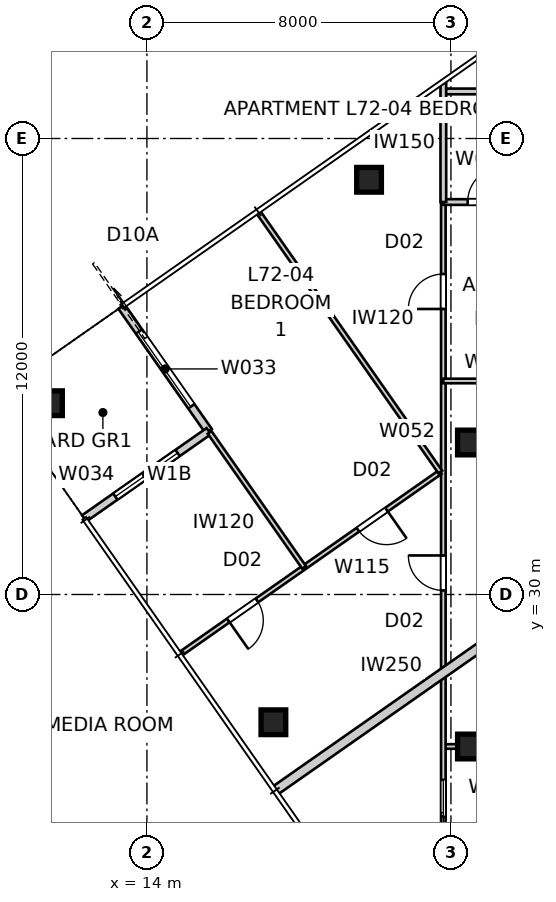
"""IFC4 building model, lengths in metres.
Left out: names, types, materials, properties, quantities, classifications, styles, units other than length and angle.
Written with IfcOpenShell. Run it as: python <this file> out.ifc"""

import sys

from ifc_helpers import new_model, si_unit, direction, frame, frame_2d, origin, origin_2d, place, context, subcontext, project, spatial, rectangle, extrude, element, fill, save


model = new_model("IFC4")
c1 = context("Model", 3, precision=1e-05, world=origin(), true_north=direction((0.0, 1.0)))
c2 = subcontext(c1, "Body", "Model", "MODEL_VIEW")
j1 = project(units=[si_unit("LENGTHUNIT", "METRE"), si_unit("PLANEANGLEUNIT", "RADIAN")], contexts=[c1])
p1 = place(None, origin())
s1 = spatial("IfcSite", under=j1, at=p1, CompositionType="ELEMENT")
p2 = place(p1, origin())
s2 = spatial("IfcBuilding", under=s1, at=p2, CompositionType="ELEMENT")
p3 = place(p2, frame((0.0, 0.0, 260.8)))
s3 = spatial("IfcBuildingStorey", under=s2, at=p3, CompositionType="ELEMENT", Elevation=260.8)
for number, where, z_axis, x_axis in (
    (1, (19.845, 40.914, 0.0), (0.0, 0.0, 1.0), (1.0, 0.0, 0.0)),
    (2, (11.449, 35.034, 0.0), (0.0, 0.0, 1.0), (1.0, 0.0, 0.0)),
    (3, (17.328, 26.638, 0.0), (0.0, 0.0, 1.0), (1.0, 0.0, 0.0)),
    (4, (22.5, 34.0, 0.0), (0.0, 0.0, 1.0), (1.0, 0.0, 0.0)),
    (5, (22.5, 26.0, 0.0), (0.0, 0.0, 1.0), (1.0, 0.0, 0.0)),
):
    element("IfcColumn", number, at=place(p3, frame(where, z_axis=z_axis, x_axis=x_axis)), inside=s3, PredefinedType="COLUMN", context=c2, shape_type="SweptSolid", body=[
        extrude(rectangle(XDim=0.65, YDim=0.65, at=origin_2d()), origin(), (0.0, 0.0, 1.0), 3.4),
    ])
p4 = place(p3, frame((13.333, 37.574, 0.0), z_axis=(0.0, 0.0, 1.0), x_axis=(0.573556557423, -0.819165963305, 0.0)))
e6 = element("IfcWall", 6, at=p4, inside=s3, PredefinedType="SOLIDWALL", context=c2, shape_type="SweptSolid", body=[
    extrude(rectangle(XDim=4.0, YDim=0.2, at=frame_2d((2.0, 0.0))), origin(), (0.0, 0.0, 1.0), 3.25),
])
p5 = place(p4, frame((0.8, 0.0, 0.0)))
e7 = element("IfcOpeningElement", 7, at=p5, cuts=e6, PredefinedType="OPENING", context=c2, shape_type="SweptSolid", body=[
    extrude(rectangle(XDim=2.4, YDim=2.1, at=frame_2d((1.2, 1.05))), frame((0.0, 0.11, 0.0), z_axis=(0.0, -1.0, 0.0), x_axis=(1.0, 0.0, 0.0)), (0.0, 0.0, 1.0), 0.22),
])
p6 = place(p3, frame((15.627, 34.298, 0.0), z_axis=(0.0, 0.0, 1.0), x_axis=(-0.819137286189, -0.573597512525, 0.0)))
e8 = element("IfcWall", 8, at=p6, inside=s3, PredefinedType="SOLIDWALL", context=c2, shape_type="SweptSolid", body=[
    extrude(rectangle(XDim=4.0, YDim=0.2, at=frame_2d((2.0, 0.0))), origin(), (0.0, 0.0, 1.0), 3.25),
])
p7 = place(p6, frame((1.0, 0.0, 0.45)))
e9 = element("IfcOpeningElement", 9, at=p7, cuts=e8, PredefinedType="OPENING", context=c2, shape_type="SweptSolid", body=[
    extrude(rectangle(XDim=2.0, YDim=1.8, at=frame_2d((1.0, 0.9))), frame((0.0, 0.11, 0.0), z_axis=(0.0, -1.0, 0.0), x_axis=(1.0, 0.0, 0.0)), (0.0, 0.0, 1.0), 0.22),
])
p8 = place(p3, frame((17.369, 24.836, 0.0), z_axis=(0.0, 0.0, 1.0), x_axis=(0.819152220062, 0.573576185321, 0.0)))
e10 = element("IfcWall", 10, at=p8, inside=s3, PredefinedType="PARTITIONING", context=c2, shape_type="SweptSolid", body=[
    extrude(rectangle(XDim=8.779, YDim=0.25, at=frame_2d((4.39, 0.0))), origin(), (0.0, 0.0, 1.0), 3.25),
])
p9 = place(p3, frame((24.6, 26.0, 0.0), z_axis=(0.0, 0.0, 1.0), x_axis=(-1.0, 0.0, 0.0)))
e11 = element("IfcWall", 11, at=p9, inside=s3, PredefinedType="PARTITIONING", context=c2, shape_type="SweptSolid", body=[
    extrude(rectangle(XDim=2.8, YDim=0.12, at=frame_2d((1.4, 0.0))), origin(), (0.0, 0.0, 1.0), 3.25),
])
p10 = place(p9, frame((0.77, 0.0, 0.0)))
e12 = element("IfcOpeningElement", 12, at=p10, cuts=e11, PredefinedType="OPENING", context=c2, shape_type="SweptSolid", body=[
    extrude(rectangle(XDim=0.96, YDim=2.1, at=frame_2d((0.48, 1.05))), frame((0.0, 0.07, 0.0), z_axis=(0.0, -1.0, 0.0), x_axis=(1.0, 0.0, 0.0)), (0.0, 0.0, 1.0), 0.14),
])
p11 = place(p3, frame((21.8, 18.578, 0.0), z_axis=(0.0, 0.0, 1.0), x_axis=(0.0, 1.0, 0.0)))
e13 = element("IfcWall", 13, at=p11, inside=s3, PredefinedType="PARTITIONING", context=c2, shape_type="SweptSolid", body=[
    extrude(rectangle(XDim=21.75, YDim=0.12, at=frame_2d((10.875, 0.0))), origin(), (0.0, 0.0, 1.0), 3.25),
])
p12 = place(p11, frame((11.53, 0.0, 0.0)))
e14 = element("IfcOpeningElement", 14, at=p12, cuts=e13, PredefinedType="OPENING", context=c2, shape_type="SweptSolid", body=[
    extrude(rectangle(XDim=0.92, YDim=2.34, at=frame_2d((0.46, 1.17))), frame((0.0, 0.07, 0.0), z_axis=(0.0, -1.0, 0.0), x_axis=(1.0, 0.0, 0.0)), (0.0, 0.0, 1.0), 0.14),
])
p13 = place(p11, frame((5.585, 0.0, 0.0)))
e15 = element("IfcOpeningElement", 15, at=p13, cuts=e13, PredefinedType="OPENING", context=c2, shape_type="SweptSolid", body=[
    extrude(rectangle(XDim=0.96, YDim=2.1, at=frame_2d((0.48, 1.05))), frame((0.0, 0.07, 0.0), z_axis=(0.0, -1.0, 0.0), x_axis=(1.0, 0.0, 0.0)), (0.0, 0.0, 1.0), 0.14),
])
p14 = place(p11, frame((18.936, 0.0, 0.0)))
e16 = element("IfcOpeningElement", 16, at=p14, cuts=e13, PredefinedType="OPENING", context=c2, shape_type="SweptSolid", body=[
    extrude(rectangle(XDim=0.92, YDim=2.34, at=frame_2d((0.46, 1.17))), frame((0.0, 0.07, 0.0), z_axis=(0.0, -1.0, 0.0), x_axis=(1.0, 0.0, 0.0)), (0.0, 0.0, 1.0), 0.14),
])
p15 = place(p3, frame((21.8, 35.619, 0.0), z_axis=(0.0, 0.0, 1.0), x_axis=(1.0, 0.0, 0.0)))
e17 = element("IfcWall", 17, at=p15, inside=s3, PredefinedType="PARTITIONING", context=c2, shape_type="SweptSolid", body=[
    extrude(rectangle(XDim=6.1, YDim=0.12, at=frame_2d((3.05, 0.0))), origin(), (0.0, 0.0, 1.0), 3.25),
])
p16 = place(p15, frame((2.59, 0.0, 0.0)))
e18 = element("IfcOpeningElement", 18, at=p16, cuts=e17, PredefinedType="OPENING", context=c2, shape_type="SweptSolid", body=[
    extrude(rectangle(XDim=0.92, YDim=2.34, at=frame_2d((0.46, 1.17))), frame((0.0, 0.07, 0.0), z_axis=(0.0, -1.0, 0.0), x_axis=(1.0, 0.0, 0.0)), (0.0, 0.0, 1.0), 0.14),
])
p17 = place(p3, frame((21.8, 40.328, 0.0), z_axis=(0.0, 0.0, 1.0), x_axis=(1.0, 0.0, 0.0)))
e19 = element("IfcWall", 19, at=p17, inside=s3, PredefinedType="SOLIDWALL", context=c2, shape_type="SweptSolid", body=[
    extrude(rectangle(XDim=2.102, YDim=0.15, at=frame_2d((1.051, 0.0))), origin(), (0.0, 0.0, 1.0), 3.25),
])
p18 = place(p17, frame((0.641, 0.0, 0.0)))
e20 = element("IfcOpeningElement", 20, at=p18, cuts=e19, PredefinedType="OPENING", context=c2, shape_type="SweptSolid", body=[
    extrude(rectangle(XDim=0.92, YDim=2.34, at=frame_2d((0.46, 1.17))), frame((0.0, 0.085, 0.0), z_axis=(0.0, -1.0, 0.0), x_axis=(1.0, 0.0, 0.0)), (0.0, 0.0, 1.0), 0.17),
])
p19 = place(p3, frame((21.8, 43.238, 0.0), z_axis=(0.0, 0.0, 1.0), x_axis=(1.0, 0.0, 0.0)))
e21 = element("IfcWall", 21, at=p19, inside=s3, PredefinedType="SOLIDWALL", context=c2, shape_type="SweptSolid", body=[
    extrude(rectangle(XDim=6.455, YDim=0.15, at=frame_2d((3.228, 0.0))), origin(), (0.0, 0.0, 1.0), 3.25),
])
p20 = place(p19, frame((3.646, 0.0, 0.0)))
e22 = element("IfcOpeningElement", 22, at=p20, cuts=e21, PredefinedType="OPENING", context=c2, shape_type="SweptSolid", body=[
    extrude(rectangle(XDim=0.96, YDim=2.1, at=frame_2d((0.48, 1.05))), frame((0.0, 0.085, 0.0), z_axis=(0.0, -1.0, 0.0), x_axis=(1.0, 0.0, 0.0)), (0.0, 0.0, 1.0), 0.17),
])
p21 = place(p3, frame((21.8, 40.328, 0.0), z_axis=(0.0, 0.0, 1.0), x_axis=(0.0, 1.0, 0.0)))
e23 = element("IfcWall", 23, at=p21, inside=s3, PredefinedType="SOLIDWALL", context=c2, shape_type="SweptSolid", body=[
    extrude(rectangle(XDim=3.126, YDim=0.15, at=frame_2d((1.563, 0.0))), origin(), (0.0, 0.0, 1.0), 3.25),
])
p22 = place(p3, frame((21.72, 33.223, 0.0), z_axis=(0.0, 0.0, 1.0), x_axis=(-0.819152099525, -0.573576357466, 0.0)))
e24 = element("IfcWall", 24, at=p22, inside=s3, PredefinedType="PARTITIONING", context=c2, shape_type="SweptSolid", body=[
    extrude(rectangle(XDim=8.335, YDim=0.12, at=frame_2d((4.167, 0.0))), origin(), (0.0, 0.0, 1.0), 3.25),
])
p23 = place(p22, frame((1.728, 0.0, 0.0)))
e25 = element("IfcOpeningElement", 25, at=p23, cuts=e24, PredefinedType="OPENING", context=c2, shape_type="SweptSolid", body=[
    extrude(rectangle(XDim=0.92, YDim=2.34, at=frame_2d((0.46, 1.17))), frame((0.0, 0.07, 0.0), z_axis=(0.0, -1.0, 0.0), x_axis=(1.0, 0.0, 0.0)), (0.0, 0.0, 1.0), 0.14),
])
p24 = place(p22, frame((5.89, 0.0, 0.0)))
e26 = element("IfcOpeningElement", 26, at=p24, cuts=e24, PredefinedType="OPENING", context=c2, shape_type="SweptSolid", body=[
    extrude(rectangle(XDim=0.92, YDim=2.34, at=frame_2d((0.46, 1.17))), frame((0.0, 0.07, 0.0), z_axis=(0.0, -1.0, 0.0), x_axis=(1.0, 0.0, 0.0)), (0.0, 0.0, 1.0), 0.14),
])
p25 = place(p3, frame((16.94, 40.051, 0.0), z_axis=(0.0, 0.0, 1.0), x_axis=(0.573576357466, -0.819152099525, 0.0)))
e27 = element("IfcWall", 27, at=p25, inside=s3, PredefinedType="PARTITIONING", context=c2, shape_type="SweptSolid", body=[
    extrude(rectangle(XDim=8.335, YDim=0.12, at=frame_2d((4.167, 0.0))), origin(), (0.0, 0.0, 1.0), 3.25),
])
p26 = place(p3, frame((18.137, 30.714, 0.0), z_axis=(0.0, 0.0, 1.0), x_axis=(-0.573594626521, 0.819139307094, 0.0)))
e28 = element("IfcWall", 28, at=p26, inside=s3, PredefinedType="PARTITIONING", context=c2, shape_type="SweptSolid", body=[
    extrude(rectangle(XDim=4.335, YDim=0.12, at=frame_2d((2.167, 0.0))), origin(), (0.0, 0.0, 1.0), 3.25),
])
p27 = place(p5, origin())
e29 = element("IfcDoor", 29, at=p27, inside=s3, OperationType="SLIDING_TO_LEFT", PredefinedType="DOOR", context=c2, shape_type="SweptSolid", body=[
    extrude(rectangle(XDim=2.4, YDim=2.1, at=frame_2d((1.2, 1.05))), frame((0.0, 0.025, 0.0), z_axis=(0.0, -1.0, 0.0), x_axis=(1.0, 0.0, 0.0)), (0.0, 0.0, 1.0), 0.05),
])
fill(e7, e29)
p28 = place(p7, origin())
e30 = element("IfcWindow", 30, at=p28, inside=s3, PartitioningType="SINGLE_PANEL", PredefinedType="WINDOW", context=c2, shape_type="SweptSolid", body=[
    extrude(rectangle(XDim=2.0, YDim=1.8, at=frame_2d((1.0, 0.9))), frame((0.0, 0.03, 0.0), z_axis=(0.0, -1.0, 0.0), x_axis=(1.0, 0.0, 0.0)), (0.0, 0.0, 1.0), 0.06),
])
fill(e9, e30)
p29 = place(p12, origin())
e31 = element("IfcDoor", 31, at=p29, inside=s3, OperationType="SINGLE_SWING_RIGHT", PredefinedType="DOOR", context=c2, shape_type="SweptSolid", body=[
    extrude(rectangle(XDim=0.92, YDim=2.34, at=frame_2d((0.46, 1.17))), frame((0.0, 0.025, 0.0), z_axis=(0.0, -1.0, 0.0), x_axis=(1.0, 0.0, 0.0)), (0.0, 0.0, 1.0), 0.05),
])
fill(e14, e31)
p30 = place(p13, origin())
e32 = element("IfcDoor", 32, at=p30, inside=s3, OperationType="SLIDING_TO_LEFT", PredefinedType="DOOR", context=c2, shape_type="SweptSolid", body=[
    extrude(rectangle(XDim=0.96, YDim=2.1, at=frame_2d((0.48, 1.05))), frame((0.0, 0.025, 0.0), z_axis=(0.0, -1.0, 0.0), x_axis=(1.0, 0.0, 0.0)), (0.0, 0.0, 1.0), 0.05),
])
fill(e15, e32)
p31 = place(p14, origin())
e33 = element("IfcDoor", 33, at=p31, inside=s3, OperationType="SINGLE_SWING_LEFT", PredefinedType="DOOR", context=c2, shape_type="SweptSolid", body=[
    extrude(rectangle(XDim=0.92, YDim=2.34, at=frame_2d((0.46, 1.17))), frame((0.0, 0.025, 0.0), z_axis=(0.0, -1.0, 0.0), x_axis=(1.0, 0.0, 0.0)), (0.0, 0.0, 1.0), 0.05),
])
fill(e16, e33)
p32 = place(p18, origin())
e34 = element("IfcDoor", 34, at=p32, inside=s3, OperationType="SINGLE_SWING_RIGHT", PredefinedType="DOOR", context=c2, shape_type="SweptSolid", body=[
    extrude(rectangle(XDim=0.92, YDim=2.34, at=frame_2d((0.46, 1.17))), frame((0.0, 0.025, 0.0), z_axis=(0.0, -1.0, 0.0), x_axis=(1.0, 0.0, 0.0)), (0.0, 0.0, 1.0), 0.05),
])
fill(e20, e34)
p33 = place(p23, origin())
e35 = element("IfcDoor", 35, at=p33, inside=s3, OperationType="SINGLE_SWING_LEFT", PredefinedType="DOOR", context=c2, shape_type="SweptSolid", body=[
    extrude(rectangle(XDim=0.92, YDim=2.34, at=frame_2d((0.46, 1.17))), frame((0.0, 0.025, 0.0), z_axis=(0.0, -1.0, 0.0), x_axis=(1.0, 0.0, 0.0)), (0.0, 0.0, 1.0), 0.05),
])
fill(e25, e35)
p34 = place(p24, origin())
e36 = element("IfcDoor", 36, at=p34, inside=s3, OperationType="SINGLE_SWING_RIGHT", PredefinedType="DOOR", context=c2, shape_type="SweptSolid", body=[
    extrude(rectangle(XDim=0.92, YDim=2.34, at=frame_2d((0.46, 1.17))), frame((0.0, 0.025, 0.0), z_axis=(0.0, -1.0, 0.0), x_axis=(1.0, 0.0, 0.0)), (0.0, 0.0, 1.0), 0.05),
])
fill(e26, e36)
save(model, sys.argv[1])
